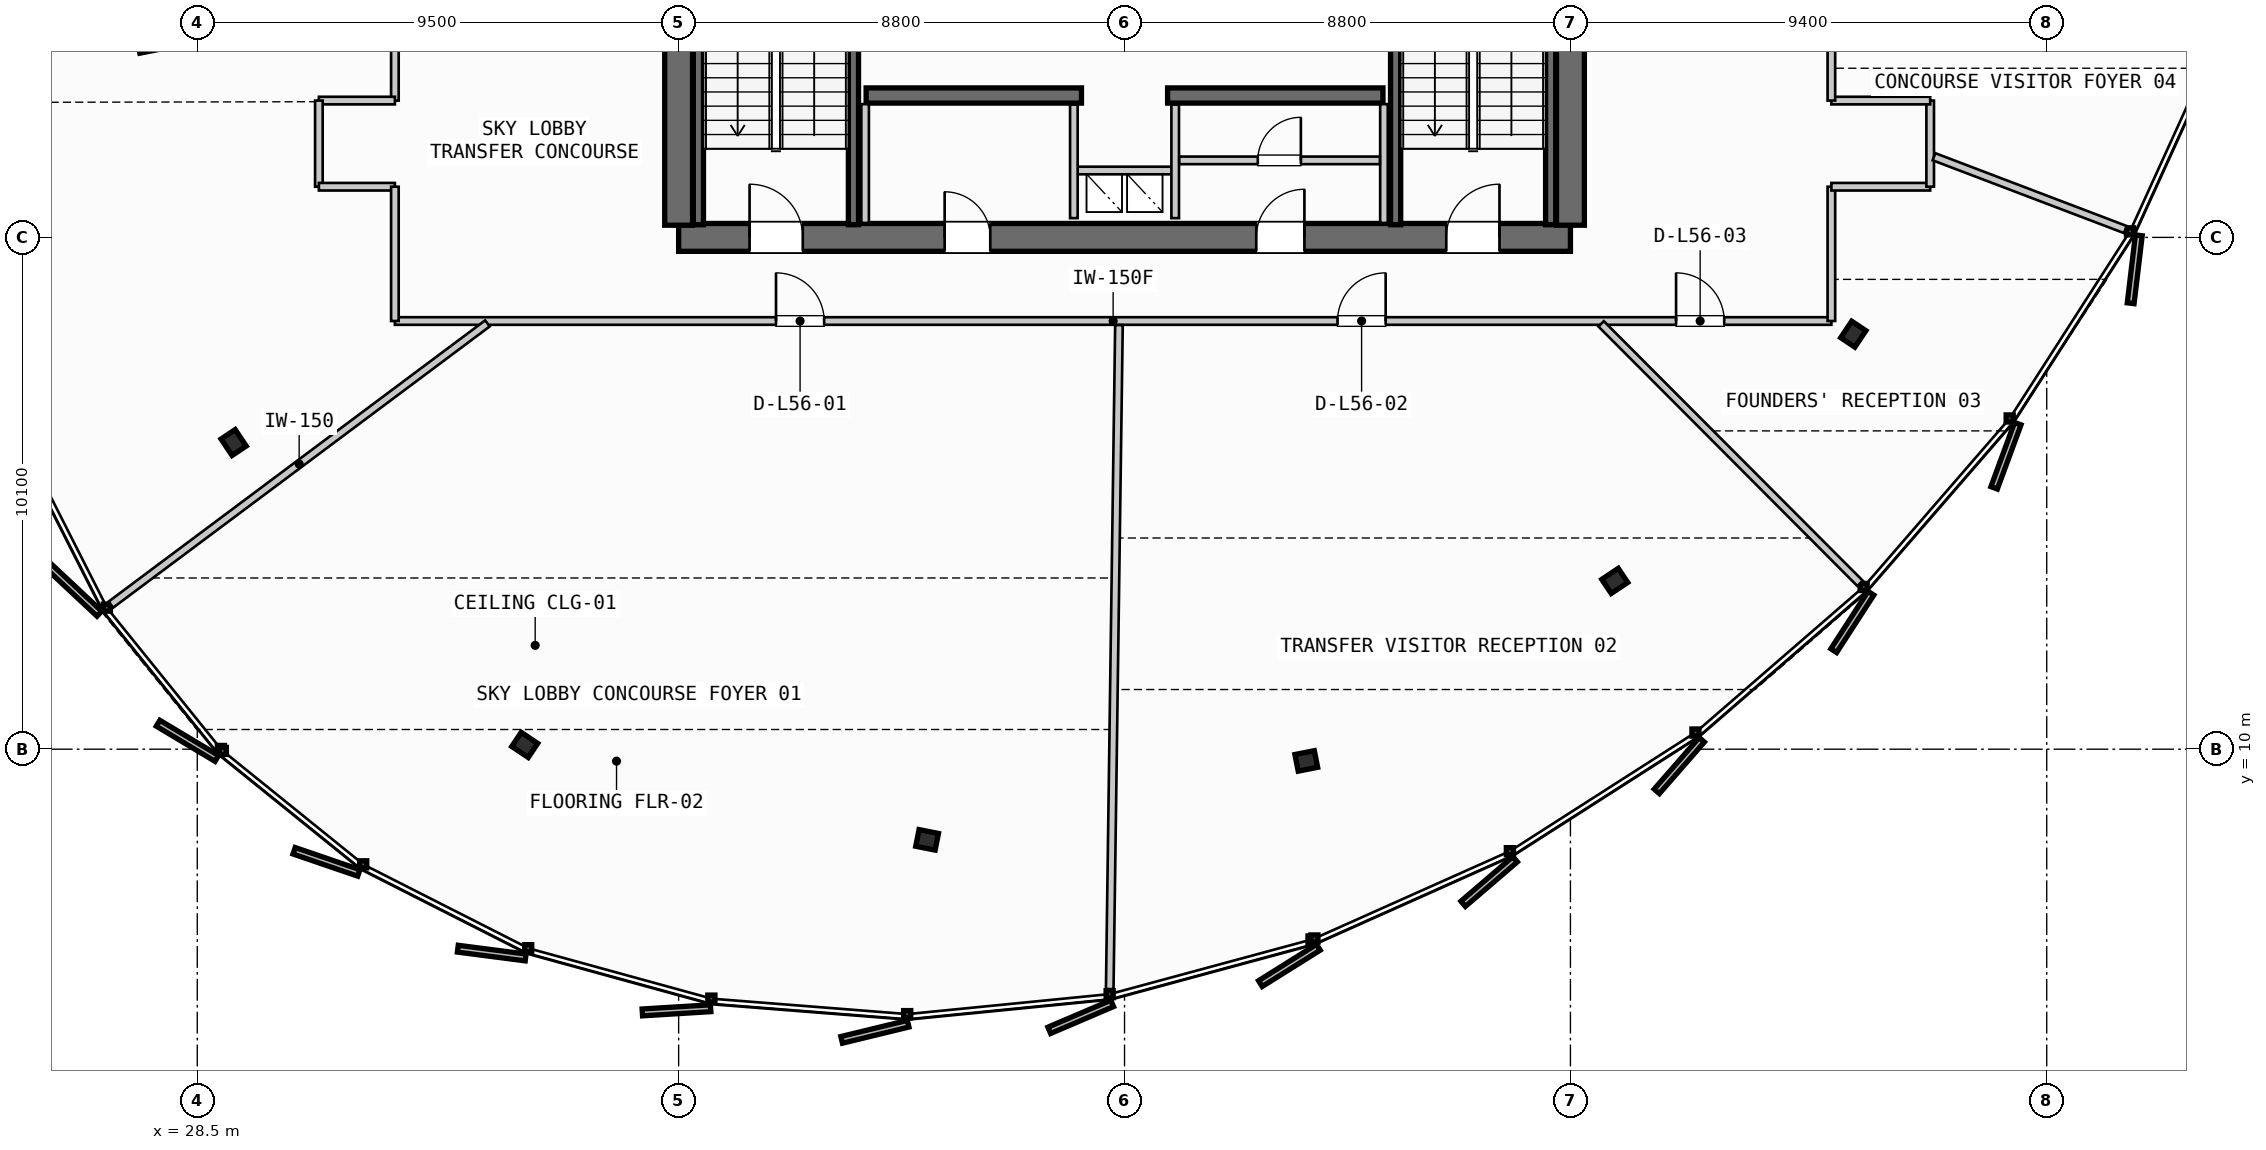
"""IFC4 building model, lengths in metres.
Left out: names, types, materials, properties, quantities, classifications, styles, units other than length and angle.
Written with IfcOpenShell. Run it as: python <this file> out.ifc"""

import sys

from ifc_helpers import new_model, si_unit, direction, frame, frame_2d, origin, origin_2d, place, context, subcontext, project, spatial, rectangle, i_section, extrude, source, transform, mapped, element, fill, save


model = new_model("IFC4")
c1 = context("Model", 3, precision=1e-05, world=origin(), true_north=direction((0.0, 1.0)))
c2 = subcontext(c1, "Body", "Model", "MODEL_VIEW")
j1 = project(units=[si_unit("LENGTHUNIT", "METRE"), si_unit("PLANEANGLEUNIT", "RADIAN")], contexts=[c1])
p1 = place(None, origin())
s1 = spatial("IfcSite", under=j1, at=p1, CompositionType="ELEMENT")
p2 = place(p1, origin())
s2 = spatial("IfcBuilding", under=s1, at=p2, CompositionType="ELEMENT")
p3 = place(p2, frame((0.0, 0.0, 214.9)))
s3 = spatial("IfcBuildingStorey", under=s2, at=p3, CompositionType="ELEMENT", Elevation=214.9)
p4 = place(p3, frame((38.0, 20.1, 0.0), z_axis=(0.0, 0.0, 1.0), x_axis=(1.0, 0.0, 0.0)))
e1 = element("IfcWall", 1, at=p4, inside=s3, PredefinedType="SHEAR", context=c2, shape_type="SweptSolid", body=[
    extrude(rectangle(XDim=17.6, YDim=0.55, at=frame_2d((8.8, 0.0))), origin(), (0.0, 0.0, 1.0), 3.24),
])
p5 = place(p4, frame((1.4, 0.0, 0.0)))
e2 = element("IfcOpeningElement", 2, at=p5, cuts=e1, PredefinedType="OPENING", context=c2, shape_type="SweptSolid", body=[
    extrude(rectangle(XDim=1.05, YDim=2.15, at=frame_2d((0.525, 1.075))), frame((0.0, 0.285, 0.0), z_axis=(0.0, -1.0, 0.0), x_axis=(1.0, 0.0, 0.0)), (0.0, 0.0, 1.0), 0.57),
])
p6 = place(p4, frame((15.15, 0.0, 0.0)))
e3 = element("IfcOpeningElement", 3, at=p6, cuts=e1, PredefinedType="OPENING", context=c2, shape_type="SweptSolid", body=[
    extrude(rectangle(XDim=1.05, YDim=2.15, at=frame_2d((0.525, 1.075))), frame((0.0, 0.285, 0.0), z_axis=(0.0, -1.0, 0.0), x_axis=(1.0, 0.0, 0.0)), (0.0, 0.0, 1.0), 0.57),
])
p7 = place(p4, frame((5.25, 0.0, 0.0)))
e4 = element("IfcOpeningElement", 4, at=p7, cuts=e1, PredefinedType="OPENING", context=c2, shape_type="SweptSolid", body=[
    extrude(rectangle(XDim=0.9, YDim=2.15, at=frame_2d((0.45, 1.075))), frame((0.0, 0.285, 0.0), z_axis=(0.0, -1.0, 0.0), x_axis=(1.0, 0.0, 0.0)), (0.0, 0.0, 1.0), 0.57),
])
p8 = place(p4, frame((11.4, 0.0, 0.0)))
e5 = element("IfcOpeningElement", 5, at=p8, cuts=e1, PredefinedType="OPENING", context=c2, shape_type="SweptSolid", body=[
    extrude(rectangle(XDim=0.95, YDim=2.15, at=frame_2d((0.475, 1.075))), frame((0.0, 0.285, 0.0), z_axis=(0.0, -1.0, 0.0), x_axis=(1.0, 0.0, 0.0)), (0.0, 0.0, 1.0), 0.57),
])
p9 = place(p3, frame((38.0, 35.26, 0.0), z_axis=(0.0, 0.0, 1.0), x_axis=(0.0, -1.0, 0.0)))
e6 = element("IfcWall", 6, at=p9, inside=s3, PredefinedType="SHEAR", context=c2, shape_type="SweptSolid", body=[
    extrude(rectangle(XDim=14.92, YDim=0.55, at=frame_2d((7.46, 0.0))), origin(), (0.0, 0.0, 1.0), 3.24),
])
p10 = place(p9, frame((5.21, 0.0, 0.0)))
e7 = element("IfcOpeningElement", 7, at=p10, cuts=e6, PredefinedType="OPENING", context=c2, shape_type="SweptSolid", body=[
    extrude(rectangle(XDim=1.1, YDim=2.2, at=frame_2d((0.55, 1.1))), frame((0.0, 0.285, 0.0), z_axis=(0.0, -1.0, 0.0), x_axis=(1.0, 0.0, 0.0)), (0.0, 0.0, 1.0), 0.57),
])
p11 = place(p3, frame((55.6, 20.34, 0.0), z_axis=(0.0, 0.0, 1.0), x_axis=(0.0, 1.0, 0.0)))
e8 = element("IfcWall", 8, at=p11, inside=s3, PredefinedType="SHEAR", context=c2, shape_type="SweptSolid", body=[
    extrude(rectangle(XDim=14.92, YDim=0.55, at=frame_2d((7.46, 0.0))), origin(), (0.0, 0.0, 1.0), 3.24),
])
p12 = place(p11, frame((12.71, 0.0, 0.0)))
e9 = element("IfcOpeningElement", 9, at=p12, cuts=e8, PredefinedType="OPENING", context=c2, shape_type="SweptSolid", body=[
    extrude(rectangle(XDim=1.05, YDim=2.15, at=frame_2d((0.525, 1.075))), frame((0.0, 0.285, 0.0), z_axis=(0.0, -1.0, 0.0), x_axis=(1.0, 0.0, 0.0)), (0.0, 0.0, 1.0), 0.57),
])
p13 = place(p11, frame((8.61, 0.0, 0.0)))
e10 = element("IfcOpeningElement", 10, at=p13, cuts=e8, PredefinedType="OPENING", context=c2, shape_type="SweptSolid", body=[
    extrude(rectangle(XDim=1.1, YDim=2.2, at=frame_2d((0.55, 1.1))), frame((0.0, 0.285, 0.0), z_axis=(0.0, -1.0, 0.0), x_axis=(1.0, 0.0, 0.0)), (0.0, 0.0, 1.0), 0.57),
])
for number, where, z_axis, x_axis in (
    (11, (41.7, 22.9, 0.0), (0.0, 0.0, 1.0), (1.0, 0.0, 0.0)),
    (12, (47.65, 22.9, 0.0), (0.0, 0.0, 1.0), (1.0, 0.0, 0.0)),
):
    element("IfcWall", number, at=place(p3, frame(where, z_axis=z_axis, x_axis=x_axis)), inside=s3, PredefinedType="SHEAR", context=c2, shape_type="SweptSolid", body=[
        extrude(rectangle(XDim=4.25, YDim=0.3, at=frame_2d((2.125, 0.0))), origin(), (0.0, 0.0, 1.0), 3.24),
    ])
m1 = source(origin(), c2, "Body", "SweptSolid", [
    extrude(i_section(OverallWidth=0.391, OverallDepth=0.335, WebThickness=0.023, FlangeThickness=0.034, FilletRadius=0.015, at=origin_2d()), origin(), (0.0, 0.0, 1.0), 3.24),
])
for number, where, z_axis, x_axis in (
    (13, (29.218, 16.052, 0.0), (0.0, 0.0, 1.0), (-0.831, -0.556, 0.0)),
    (14, (34.963, 10.084, 0.0), (0.0, 0.0, 1.0), (-0.556, -0.831, 0.0)),
    (15, (42.904, 8.211, 0.0), (0.0, 0.0, 1.0), (-0.195, -0.981, 0.0)),
    (16, (50.387, 9.769, 0.0), (0.0, 0.0, 1.0), (0.195, -0.981, 0.0)),
    (17, (56.475, 13.321, 0.0), (0.0, 0.0, 1.0), (0.556, -0.831, 0.0)),
    (18, (61.183, 18.19, 0.0), (0.0, 0.0, 1.0), (0.831, -0.556, 0.0)),
):
    element("IfcColumn", number, at=place(p3, frame(where, z_axis=z_axis, x_axis=x_axis)), inside=s3, PredefinedType="COLUMN", context=c2, shape_type="MappedRepresentation", body=[
        mapped(m1, transform((0.0, 0.0, 0.0), scale=1.0)),
    ])
for number, where, z_axis, x_axis in (
    (19, (41.45, 27.7, 0.0), (0.0, 0.0, 1.0), (0.0, -1.0, 0.0)),
    (20, (38.39, 20.35, 0.0), (0.0, 0.0, 1.0), (0.0, 1.0, 0.0)),
    (21, (55.21, 27.7, 0.0), (0.0, 0.0, 1.0), (0.0, -1.0, 0.0)),
    (22, (52.15, 20.35, 0.0), (0.0, 0.0, 1.0), (0.0, 1.0, 0.0)),
):
    element("IfcWall", number, at=place(p3, frame(where, z_axis=z_axis, x_axis=x_axis)), inside=s3, PredefinedType="SHEAR", context=c2, shape_type="SweptSolid", body=[
        extrude(rectangle(XDim=7.35, YDim=0.2, at=frame_2d((3.675, 0.0))), origin(), (0.0, 0.0, 1.0), 3.24),
    ])
p14 = place(p3, frame((45.8, 21.42, 0.0), z_axis=(0.0, 0.0, 1.0), x_axis=(1.0, 0.0, 0.0)))
e23 = element("IfcWall", 23, at=p14, inside=s3, PredefinedType="PARTITIONING", context=c2, shape_type="SweptSolid", body=[
    extrude(rectangle(XDim=2.0, YDim=0.15, at=frame_2d((1.0, 0.0))), origin(), (0.0, 0.0, 1.0), 2.295),
])
for number, where, z_axis, x_axis in (
    (24, (45.8, 20.48, 0.0), (0.0, 0.0, 1.0), (0.0, 1.0, 0.0)),
    (25, (47.8, 20.48, 0.0), (0.0, 0.0, 1.0), (0.0, 1.0, 0.0)),
):
    element("IfcWall", number, at=place(p3, frame(where, z_axis=z_axis, x_axis=x_axis)), inside=s3, PredefinedType="PARTITIONING", context=c2, shape_type="SweptSolid", body=[
        extrude(rectangle(XDim=2.24, YDim=0.15, at=frame_2d((1.12, 0.0))), origin(), (0.0, 0.0, 1.0), 2.295),
    ])
for number, where, z_axis, x_axis in (
    (26, (41.68, 20.385, 0.0), (0.0, 0.0, 1.0), (0.0, 1.0, 0.0)),
    (27, (51.92, 20.385, 0.0), (0.0, 0.0, 1.0), (0.0, 1.0, 0.0)),
):
    element("IfcWall", number, at=place(p3, frame(where, z_axis=z_axis, x_axis=x_axis)), inside=s3, PredefinedType="PARTITIONING", context=c2, shape_type="SweptSolid", body=[
        extrude(rectangle(XDim=2.345, YDim=0.15, at=frame_2d((1.172, 0.0))), origin(), (0.0, 0.0, 1.0), 2.295),
    ])
p15 = place(p3, frame((47.88, 21.62, 0.0), z_axis=(0.0, 0.0, 1.0), x_axis=(1.0, 0.0, 0.0)))
e28 = element("IfcWall", 28, at=p15, inside=s3, PredefinedType="PARTITIONING", context=c2, shape_type="SweptSolid", body=[
    extrude(rectangle(XDim=3.96, YDim=0.15, at=frame_2d((1.98, 0.0))), origin(), (0.0, 0.0, 1.0), 2.295),
])
p16 = place(p15, frame((1.55, 0.0, 0.0)))
e29 = element("IfcOpeningElement", 29, at=p16, cuts=e28, PredefinedType="OPENING", context=c2, shape_type="SweptSolid", body=[
    extrude(rectangle(XDim=0.85, YDim=2.15, at=frame_2d((0.425, 1.075))), frame((0.0, 0.085, 0.0), z_axis=(0.0, -1.0, 0.0), x_axis=(1.0, 0.0, 0.0)), (0.0, 0.0, 1.0), 0.17),
])
p17 = place(p3, frame((32.4, 18.45, 0.0), z_axis=(0.0, 0.0, 1.0), x_axis=(1.0, 0.0, 0.0)))
e30 = element("IfcWall", 30, at=p17, inside=s3, PredefinedType="PARTITIONING", context=c2, shape_type="SweptSolid", body=[
    extrude(rectangle(XDim=28.35, YDim=0.15, at=frame_2d((14.175, 0.0))), origin(), (0.0, 0.0, 1.0), 2.295),
])
p18 = place(p17, frame((7.522, 0.0, 0.0)))
e31 = element("IfcOpeningElement", 31, at=p18, cuts=e30, PredefinedType="OPENING", context=c2, shape_type="SweptSolid", body=[
    extrude(rectangle(XDim=0.95, YDim=2.15, at=frame_2d((0.475, 1.075))), frame((0.0, 0.085, 0.0), z_axis=(0.0, -1.0, 0.0), x_axis=(1.0, 0.0, 0.0)), (0.0, 0.0, 1.0), 0.17),
])
p19 = place(p17, frame((18.604, 0.0, 0.0)))
e32 = element("IfcOpeningElement", 32, at=p19, cuts=e30, PredefinedType="OPENING", context=c2, shape_type="SweptSolid", body=[
    extrude(rectangle(XDim=0.95, YDim=2.15, at=frame_2d((0.475, 1.075))), frame((0.0, 0.085, 0.0), z_axis=(0.0, -1.0, 0.0), x_axis=(1.0, 0.0, 0.0)), (0.0, 0.0, 1.0), 0.17),
])
p20 = place(p17, frame((25.285, 0.0, 0.0)))
e33 = element("IfcOpeningElement", 33, at=p20, cuts=e30, PredefinedType="OPENING", context=c2, shape_type="SweptSolid", body=[
    extrude(rectangle(XDim=0.95, YDim=2.15, at=frame_2d((0.475, 1.075))), frame((0.0, 0.085, 0.0), z_axis=(0.0, -1.0, 0.0), x_axis=(1.0, 0.0, 0.0)), (0.0, 0.0, 1.0), 0.17),
])
p21 = place(p3, frame((60.75, 18.45, 0.0), z_axis=(0.0, 0.0, 1.0), x_axis=(0.0, 1.0, 0.0)))
e34 = element("IfcWall", 34, at=p21, inside=s3, PredefinedType="PARTITIONING", context=c2, shape_type="SweptSolid", body=[
    extrude(rectangle(XDim=2.65, YDim=0.15, at=frame_2d((1.325, 0.0))), origin(), (0.0, 0.0, 1.0), 2.295),
])
p22 = place(p3, frame((60.75, 21.1, 0.0), z_axis=(0.0, 0.0, 1.0), x_axis=(1.0, 0.0, 0.0)))
e35 = element("IfcWall", 35, at=p22, inside=s3, PredefinedType="PARTITIONING", context=c2, shape_type="SweptSolid", body=[
    extrude(rectangle(XDim=1.95, YDim=0.15, at=frame_2d((0.975, 0.0))), origin(), (0.0, 0.0, 1.0), 2.295),
])
p23 = place(p3, frame((62.7, 21.1, 0.0), z_axis=(0.0, 0.0, 1.0), x_axis=(0.0, 1.0, 0.0)))
e36 = element("IfcWall", 36, at=p23, inside=s3, PredefinedType="PARTITIONING", context=c2, shape_type="SweptSolid", body=[
    extrude(rectangle(XDim=1.7, YDim=0.15, at=frame_2d((0.85, 0.0))), origin(), (0.0, 0.0, 1.0), 2.295),
])
p24 = place(p3, frame((62.7, 22.8, 0.0), z_axis=(0.0, 0.0, 1.0), x_axis=(-1.0, 0.0, 0.0)))
e37 = element("IfcWall", 37, at=p24, inside=s3, PredefinedType="PARTITIONING", context=c2, shape_type="SweptSolid", body=[
    extrude(rectangle(XDim=1.95, YDim=0.15, at=frame_2d((0.975, 0.0))), origin(), (0.0, 0.0, 1.0), 2.295),
])
p25 = place(p3, frame((60.75, 22.8, 0.0), z_axis=(0.0, 0.0, 1.0), x_axis=(0.0, 1.0, 0.0)))
e38 = element("IfcWall", 38, at=p25, inside=s3, PredefinedType="PARTITIONING", context=c2, shape_type="SweptSolid", body=[
    extrude(rectangle(XDim=10.0, YDim=0.15, at=frame_2d((5.0, 0.0))), origin(), (0.0, 0.0, 1.0), 2.295),
])
p26 = place(p25, frame((2.453, 0.0, 0.0)))
e39 = element("IfcOpeningElement", 39, at=p26, cuts=e38, PredefinedType="OPENING", context=c2, shape_type="SweptSolid", body=[
    extrude(rectangle(XDim=0.95, YDim=2.15, at=frame_2d((0.475, 1.075))), frame((0.0, 0.085, 0.0), z_axis=(0.0, -1.0, 0.0), x_axis=(1.0, 0.0, 0.0)), (0.0, 0.0, 1.0), 0.17),
])
p27 = place(p25, frame((6.873, 0.0, 0.0)))
e40 = element("IfcOpeningElement", 40, at=p27, cuts=e38, PredefinedType="OPENING", context=c2, shape_type="SweptSolid", body=[
    extrude(rectangle(XDim=0.95, YDim=2.15, at=frame_2d((0.475, 1.075))), frame((0.0, 0.085, 0.0), z_axis=(0.0, -1.0, 0.0), x_axis=(1.0, 0.0, 0.0)), (0.0, 0.0, 1.0), 0.17),
])
p28 = place(p3, frame((32.4, 32.8, 0.0), z_axis=(0.0, 0.0, 1.0), x_axis=(0.0, -1.0, 0.0)))
e41 = element("IfcWall", 41, at=p28, inside=s3, PredefinedType="PARTITIONING", context=c2, shape_type="SweptSolid", body=[
    extrude(rectangle(XDim=10.0, YDim=0.15, at=frame_2d((5.0, 0.0))), origin(), (0.0, 0.0, 1.0), 2.295),
])
p29 = place(p28, frame((4.525, 0.0, 0.0)))
e42 = element("IfcOpeningElement", 42, at=p29, cuts=e41, PredefinedType="OPENING", context=c2, shape_type="SweptSolid", body=[
    extrude(rectangle(XDim=0.95, YDim=2.15, at=frame_2d((0.475, 1.075))), frame((0.0, 0.085, 0.0), z_axis=(0.0, -1.0, 0.0), x_axis=(1.0, 0.0, 0.0)), (0.0, 0.0, 1.0), 0.17),
])
p30 = place(p3, frame((32.4, 22.8, 0.0), z_axis=(0.0, 0.0, 1.0), x_axis=(-1.0, 0.0, 0.0)))
e43 = element("IfcWall", 43, at=p30, inside=s3, PredefinedType="PARTITIONING", context=c2, shape_type="SweptSolid", body=[
    extrude(rectangle(XDim=1.5, YDim=0.15, at=frame_2d((0.75, 0.0))), origin(), (0.0, 0.0, 1.0), 2.295),
])
p31 = place(p3, frame((30.9, 22.8, 0.0), z_axis=(0.0, 0.0, 1.0), x_axis=(0.0, -1.0, 0.0)))
e44 = element("IfcWall", 44, at=p31, inside=s3, PredefinedType="PARTITIONING", context=c2, shape_type="SweptSolid", body=[
    extrude(rectangle(XDim=1.7, YDim=0.15, at=frame_2d((0.85, 0.0))), origin(), (0.0, 0.0, 1.0), 2.295),
])
p32 = place(p3, frame((30.9, 21.1, 0.0), z_axis=(0.0, 0.0, 1.0), x_axis=(1.0, 0.0, 0.0)))
e45 = element("IfcWall", 45, at=p32, inside=s3, PredefinedType="PARTITIONING", context=c2, shape_type="SweptSolid", body=[
    extrude(rectangle(XDim=1.5, YDim=0.15, at=frame_2d((0.75, 0.0))), origin(), (0.0, 0.0, 1.0), 2.295),
])
p33 = place(p3, frame((32.4, 21.1, 0.0), z_axis=(0.0, 0.0, 1.0), x_axis=(0.0, -1.0, 0.0)))
e46 = element("IfcWall", 46, at=p33, inside=s3, PredefinedType="PARTITIONING", context=c2, shape_type="SweptSolid", body=[
    extrude(rectangle(XDim=2.65, YDim=0.15, at=frame_2d((1.325, 0.0))), origin(), (0.0, 0.0, 1.0), 2.295),
])
p34 = place(p3, frame((34.226, 18.402, 0.0), z_axis=(0.0, 0.0, 1.0), x_axis=(-0.801249258775, -0.598330698956, 0.0)))
e47 = element("IfcWall", 47, at=p34, inside=s3, PredefinedType="PARTITIONING", context=c2, shape_type="SweptSolid", body=[
    extrude(rectangle(XDim=9.274, YDim=0.15, at=frame_2d((4.637, 0.0))), origin(), (0.0, 0.0, 1.0), 2.295),
])
p35 = place(p3, frame((46.69, 18.37, 0.0), z_axis=(0.0, 0.0, 1.0), x_axis=(-0.013897120802, -0.999903430354, 0.0)))
e48 = element("IfcWall", 48, at=p35, inside=s3, PredefinedType="PARTITIONING", context=c2, shape_type="SweptSolid", body=[
    extrude(rectangle(XDim=13.105, YDim=0.15, at=frame_2d((6.553, 0.0))), origin(), (0.0, 0.0, 1.0), 2.295),
])
p36 = place(p3, frame((56.207, 18.393, 0.0), z_axis=(0.0, 0.0, 1.0), x_axis=(0.706363845215, -0.707848937397, 0.0)))
e49 = element("IfcWall", 49, at=p36, inside=s3, PredefinedType="PARTITIONING", context=c2, shape_type="SweptSolid", body=[
    extrude(rectangle(XDim=7.233, YDim=0.15, at=frame_2d((3.617, 0.0))), origin(), (0.0, 0.0, 1.0), 2.295),
])
p37 = place(p3, frame((62.775, 21.692, 0.0), z_axis=(0.0, 0.0, 1.0), x_axis=(0.934616919039, -0.355656034177, 0.0)))
e50 = element("IfcWall", 50, at=p37, inside=s3, PredefinedType="PARTITIONING", context=c2, shape_type="SweptSolid", body=[
    extrude(rectangle(XDim=4.04, YDim=0.15, at=frame_2d((2.02, 0.0))), origin(), (0.0, 0.0, 1.0), 2.295),
])
m2 = source(origin(), c2, "Body", "SweptSolid", [
    extrude(rectangle(XDim=1.05, YDim=2.15, at=frame_2d((0.525, 1.075))), frame((0.0, 0.025, 0.0), z_axis=(0.0, -1.0, 0.0), x_axis=(1.0, 0.0, 0.0)), (0.0, 0.0, 1.0), 0.05),
])
p38 = place(p5, origin())
e51 = element("IfcDoor", 51, at=p38, inside=s3, OperationType="SINGLE_SWING_LEFT", PredefinedType="DOOR", context=c2, shape_type="MappedRepresentation", body=[
    mapped(m2, transform((0.0, 0.0, 0.0), scale=1.0)),
])
fill(e2, e51)
p39 = place(p6, origin())
e52 = element("IfcDoor", 52, at=p39, inside=s3, OperationType="SINGLE_SWING_RIGHT", PredefinedType="DOOR", context=c2, shape_type="MappedRepresentation", body=[
    mapped(m2, transform((0.0, 0.0, 0.0), scale=1.0)),
])
fill(e3, e52)
m3 = source(origin(), c2, "Body", "SweptSolid", [
    extrude(rectangle(XDim=0.9, YDim=2.15, at=frame_2d((0.45, 1.075))), frame((0.0, 0.025, 0.0), z_axis=(0.0, -1.0, 0.0), x_axis=(1.0, 0.0, 0.0)), (0.0, 0.0, 1.0), 0.05),
])
p40 = place(p7, origin())
e53 = element("IfcDoor", 53, at=p40, inside=s3, OperationType="SINGLE_SWING_LEFT", PredefinedType="DOOR", context=c2, shape_type="MappedRepresentation", body=[
    mapped(m3, transform((0.0, 0.0, 0.0), scale=1.0)),
])
fill(e4, e53)
m4 = source(origin(), c2, "Body", "SweptSolid", [
    extrude(rectangle(XDim=0.95, YDim=2.15, at=frame_2d((0.475, 1.075))), frame((0.0, 0.025, 0.0), z_axis=(0.0, -1.0, 0.0), x_axis=(1.0, 0.0, 0.0)), (0.0, 0.0, 1.0), 0.05),
])
p41 = place(p8, origin())
e54 = element("IfcDoor", 54, at=p41, inside=s3, OperationType="SINGLE_SWING_RIGHT", PredefinedType="DOOR", context=c2, shape_type="MappedRepresentation", body=[
    mapped(m4, transform((0.0, 0.0, 0.0), scale=1.0)),
])
fill(e5, e54)
m5 = source(origin(), c2, "Body", "SweptSolid", [
    extrude(rectangle(XDim=0.85, YDim=2.15, at=frame_2d((0.425, 1.075))), frame((0.0, 0.025, 0.0), z_axis=(0.0, -1.0, 0.0), x_axis=(1.0, 0.0, 0.0)), (0.0, 0.0, 1.0), 0.05),
])
p42 = place(p16, origin())
e55 = element("IfcDoor", 55, at=p42, inside=s3, OperationType="SINGLE_SWING_RIGHT", PredefinedType="DOOR", context=c2, shape_type="MappedRepresentation", body=[
    mapped(m5, transform((0.0, 0.0, 0.0), scale=1.0)),
])
fill(e29, e55)
p43 = place(p18, origin())
e56 = element("IfcDoor", 56, at=p43, inside=s3, OperationType="SINGLE_SWING_LEFT", PredefinedType="DOOR", context=c2, shape_type="MappedRepresentation", body=[
    mapped(m4, transform((0.0, 0.0, 0.0), scale=1.0)),
])
fill(e31, e56)
p44 = place(p19, origin())
e57 = element("IfcDoor", 57, at=p44, inside=s3, OperationType="SINGLE_SWING_RIGHT", PredefinedType="DOOR", context=c2, shape_type="MappedRepresentation", body=[
    mapped(m4, transform((0.0, 0.0, 0.0), scale=1.0)),
])
fill(e32, e57)
p45 = place(p20, origin())
e58 = element("IfcDoor", 58, at=p45, inside=s3, OperationType="SINGLE_SWING_LEFT", PredefinedType="DOOR", context=c2, shape_type="MappedRepresentation", body=[
    mapped(m4, transform((0.0, 0.0, 0.0), scale=1.0)),
])
fill(e33, e58)
save(model, sys.argv[1])
